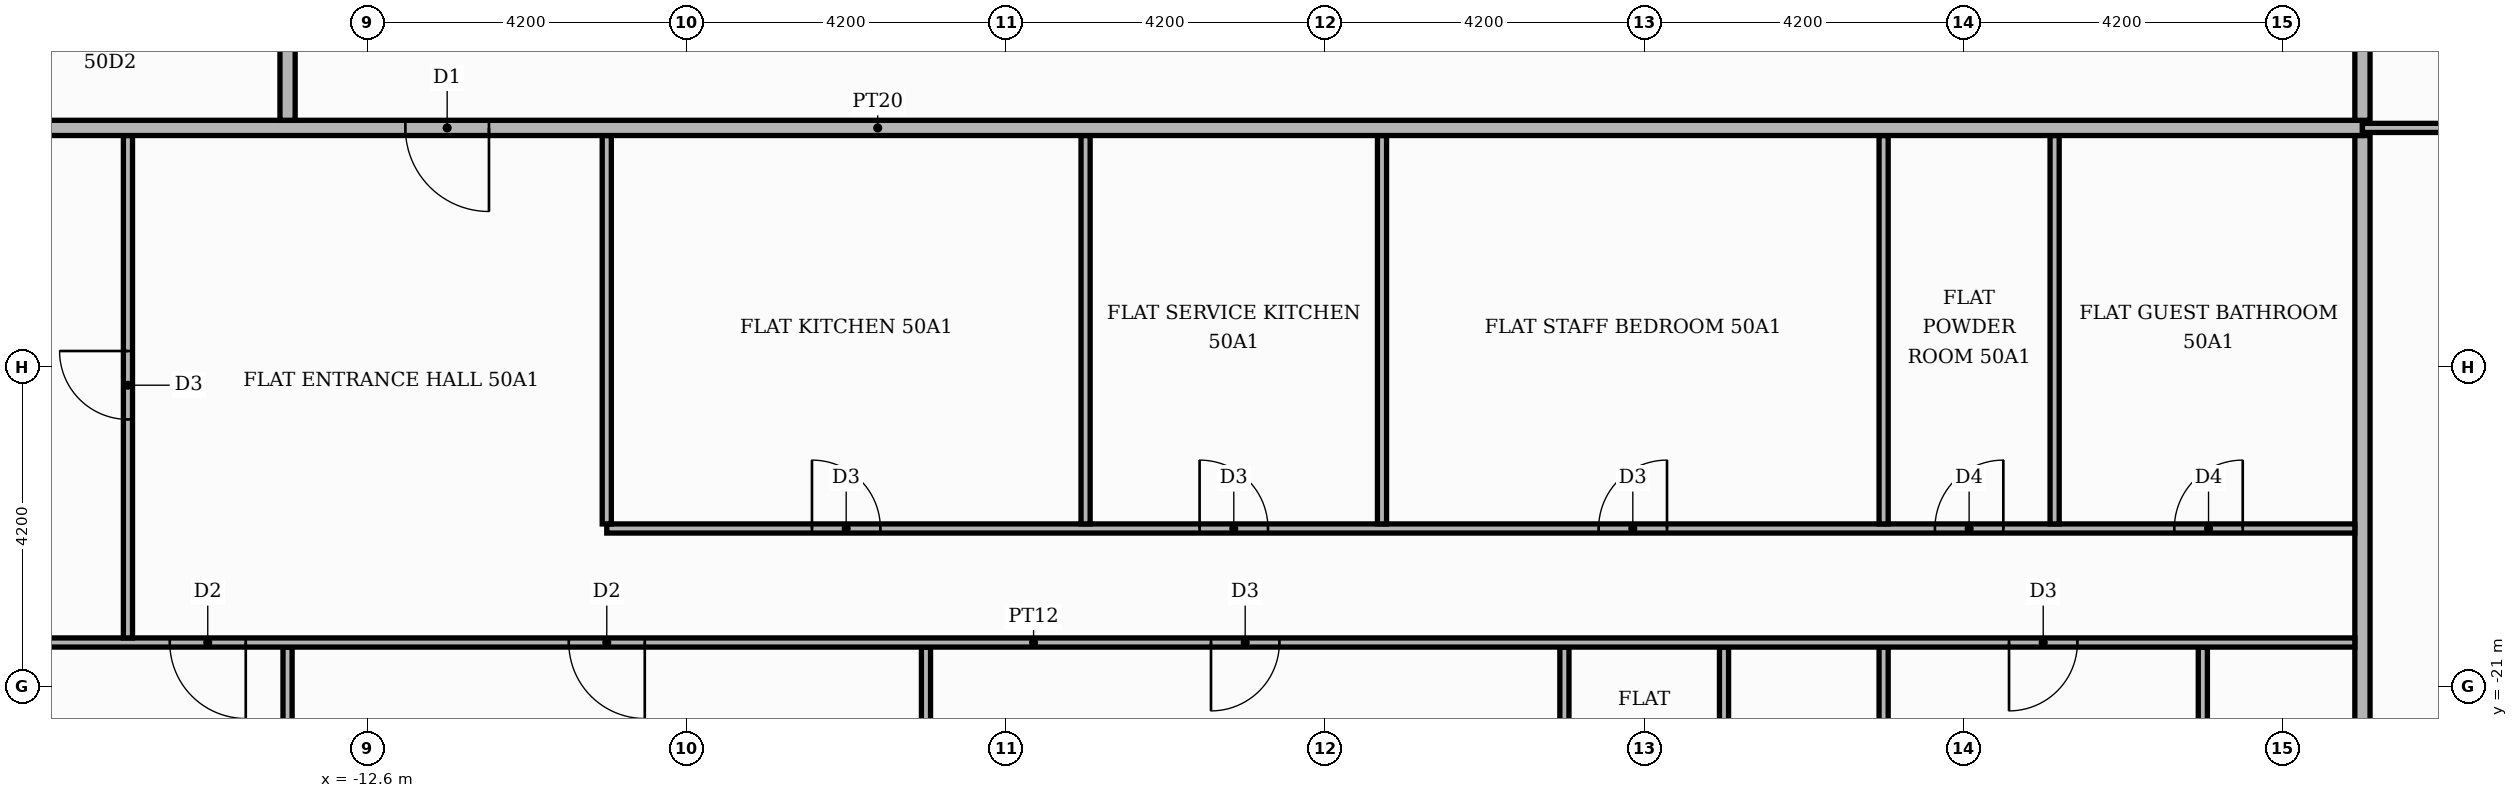
"""IFC4 building model, lengths in metres.
Left out: names, types, materials, properties, quantities, classifications, styles, units other than length and angle.
Written with IfcOpenShell. Run it as: python <this file> out.ifc"""

import sys

from ifc_helpers import new_model, si_unit, direction, frame, frame_2d, origin, place, context, subcontext, project, spatial, rectangle, extrude, element, fill, save


model = new_model("IFC4")
c1 = context("Model", 3, precision=1e-05, world=origin(), true_north=direction((0.0, 1.0)))
c2 = subcontext(c1, "Body", "Model", "MODEL_VIEW")
j1 = project(units=[si_unit("LENGTHUNIT", "METRE"), si_unit("PLANEANGLEUNIT", "RADIAN")], contexts=[c1])
p1 = place(None, origin())
s1 = spatial("IfcSite", under=j1, at=p1, CompositionType="ELEMENT")
p2 = place(p1, origin())
s2 = spatial("IfcBuilding", under=s1, at=p2, CompositionType="ELEMENT")
p3 = place(p2, frame((0.0, 0.0, 211.8)))
s3 = spatial("IfcBuildingStorey", under=s2, at=p3, CompositionType="ELEMENT", Elevation=211.8)
for number, where, z_axis, x_axis in (
    (1, (-13.65, -25.42, 0.0), (0.0, 0.0, 1.0), (0.0, 1.0, 0.0)),
    (2, (-5.25, -25.42, 0.0), (0.0, 0.0, 1.0), (0.0, 1.0, 0.0)),
):
    element("IfcWall", number, at=place(p3, frame(where, z_axis=z_axis, x_axis=x_axis)), inside=s3, PredefinedType="PARTITIONING", context=c2, shape_type="SweptSolid", body=[
        extrude(rectangle(XDim=4.94, YDim=0.12, at=frame_2d((2.47, 0.0))), origin(), (0.0, 0.0, 1.0), 3.48),
    ])
p4 = place(p3, frame((3.15, -25.42, 0.0), z_axis=(0.0, 0.0, 1.0), x_axis=(0.0, 1.0, 0.0)))
e3 = element("IfcWall", 3, at=p4, inside=s3, PredefinedType="PARTITIONING", context=c2, shape_type="SweptSolid", body=[
    extrude(rectangle(XDim=4.94, YDim=0.12, at=frame_2d((2.47, 0.0))), origin(), (0.0, 0.0, 1.0), 3.48),
])
p5 = place(p4, frame((1.9, 0.0, 0.0)))
e4 = element("IfcOpeningElement", 4, at=p5, cuts=e3, PredefinedType="OPENING", context=c2, shape_type="SweptSolid", body=[
    extrude(rectangle(XDim=0.9, YDim=2.1, at=frame_2d((0.45, 1.05))), frame((0.0, 0.07, 0.0), z_axis=(0.0, -1.0, 0.0), x_axis=(1.0, 0.0, 0.0)), (0.0, 0.0, 1.0), 0.14),
])
p6 = place(p3, frame((5.25, -25.42, 0.0), z_axis=(0.0, 0.0, 1.0), x_axis=(0.0, 1.0, 0.0)))
e5 = element("IfcWall", 5, at=p6, inside=s3, PredefinedType="PARTITIONING", context=c2, shape_type="SweptSolid", body=[
    extrude(rectangle(XDim=4.94, YDim=0.12, at=frame_2d((2.47, 0.0))), origin(), (0.0, 0.0, 1.0), 3.48),
])
p7 = place(p6, frame((1.9, 0.0, 0.0)))
e6 = element("IfcOpeningElement", 6, at=p7, cuts=e5, PredefinedType="OPENING", context=c2, shape_type="SweptSolid", body=[
    extrude(rectangle(XDim=0.9, YDim=2.1, at=frame_2d((0.45, 1.05))), frame((0.0, 0.07, 0.0), z_axis=(0.0, -1.0, 0.0), x_axis=(1.0, 0.0, 0.0)), (0.0, 0.0, 1.0), 0.14),
])
p8 = place(p3, frame((7.35, -25.42, 0.0), z_axis=(0.0, 0.0, 1.0), x_axis=(0.0, 1.0, 0.0)))
e7 = element("IfcWall", 7, at=p8, inside=s3, PredefinedType="PARTITIONING", context=c2, shape_type="SweptSolid", body=[
    extrude(rectangle(XDim=4.94, YDim=0.12, at=frame_2d((2.47, 0.0))), origin(), (0.0, 0.0, 1.0), 3.48),
])
p9 = place(p3, frame((11.55, -25.42, 0.0), z_axis=(0.0, 0.0, 1.0), x_axis=(0.0, 1.0, 0.0)))
e8 = element("IfcWall", 8, at=p9, inside=s3, PredefinedType="PARTITIONING", context=c2, shape_type="SweptSolid", body=[
    extrude(rectangle(XDim=4.94, YDim=0.12, at=frame_2d((2.47, 0.0))), origin(), (0.0, 0.0, 1.0), 3.48),
])
p10 = place(p9, frame((1.9, 0.0, 0.0)))
e9 = element("IfcOpeningElement", 9, at=p10, cuts=e8, PredefinedType="OPENING", context=c2, shape_type="SweptSolid", body=[
    extrude(rectangle(XDim=0.9, YDim=2.1, at=frame_2d((0.45, 1.05))), frame((0.0, 0.07, 0.0), z_axis=(0.0, -1.0, 0.0), x_axis=(1.0, 0.0, 0.0)), (0.0, 0.0, 1.0), 0.14),
])
p11 = place(p3, frame((13.65, -25.42, 0.0), z_axis=(0.0, 0.0, 1.0), x_axis=(0.0, 1.0, 0.0)))
e10 = element("IfcWall", 10, at=p11, inside=s3, PredefinedType="PARTITIONING", context=c2, shape_type="SweptSolid", body=[
    extrude(rectangle(XDim=11.67, YDim=0.2, at=frame_2d((5.835, 0.0))), origin(), (0.0, 0.0, 1.0), 3.48),
])
p12 = place(p3, frame((-21.219, -20.42, 0.0), z_axis=(0.0, 0.0, 1.0), x_axis=(1.0, 0.0, 0.0)))
e11 = element("IfcWall", 11, at=p12, inside=s3, PredefinedType="PARTITIONING", context=c2, shape_type="SweptSolid", body=[
    extrude(rectangle(XDim=34.769, YDim=0.12, at=frame_2d((17.385, 0.0))), origin(), (0.0, 0.0, 1.0), 3.48),
])
p13 = place(p12, frame((6.019, 0.0, 0.0)))
e12 = element("IfcOpeningElement", 12, at=p13, cuts=e11, PredefinedType="OPENING", context=c2, shape_type="SweptSolid", body=[
    extrude(rectangle(XDim=1.0, YDim=2.1, at=frame_2d((0.5, 1.05))), frame((0.0, 0.07, 0.0), z_axis=(0.0, -1.0, 0.0), x_axis=(1.0, 0.0, 0.0)), (0.0, 0.0, 1.0), 0.14),
])
p14 = place(p12, frame((11.269, 0.0, 0.0)))
e13 = element("IfcOpeningElement", 13, at=p14, cuts=e11, PredefinedType="OPENING", context=c2, shape_type="SweptSolid", body=[
    extrude(rectangle(XDim=1.0, YDim=2.1, at=frame_2d((0.5, 1.05))), frame((0.0, 0.07, 0.0), z_axis=(0.0, -1.0, 0.0), x_axis=(1.0, 0.0, 0.0)), (0.0, 0.0, 1.0), 0.14),
])
p15 = place(p12, frame((19.719, 0.0, 0.0)))
e14 = element("IfcOpeningElement", 14, at=p15, cuts=e11, PredefinedType="OPENING", context=c2, shape_type="SweptSolid", body=[
    extrude(rectangle(XDim=0.9, YDim=2.1, at=frame_2d((0.45, 1.05))), frame((0.0, 0.07, 0.0), z_axis=(0.0, -1.0, 0.0), x_axis=(1.0, 0.0, 0.0)), (0.0, 0.0, 1.0), 0.14),
])
p16 = place(p12, frame((30.219, 0.0, 0.0)))
e15 = element("IfcOpeningElement", 15, at=p16, cuts=e11, PredefinedType="OPENING", context=c2, shape_type="SweptSolid", body=[
    extrude(rectangle(XDim=0.9, YDim=2.1, at=frame_2d((0.45, 1.05))), frame((0.0, 0.07, 0.0), z_axis=(0.0, -1.0, 0.0), x_axis=(1.0, 0.0, 0.0)), (0.0, 0.0, 1.0), 0.14),
])
p17 = place(p3, frame((-15.75, -20.36, 0.0), z_axis=(0.0, 0.0, 1.0), x_axis=(0.0, 1.0, 0.0)))
e16 = element("IfcWall", 16, at=p17, inside=s3, PredefinedType="PARTITIONING", context=c2, shape_type="SweptSolid", body=[
    extrude(rectangle(XDim=6.61, YDim=0.12, at=frame_2d((3.305, 0.0))), origin(), (0.0, 0.0, 1.0), 3.48),
])
p18 = place(p17, frame((2.875, 0.0, 0.0)))
e17 = element("IfcOpeningElement", 17, at=p18, cuts=e16, PredefinedType="OPENING", context=c2, shape_type="SweptSolid", body=[
    extrude(rectangle(XDim=0.9, YDim=2.1, at=frame_2d((0.45, 1.05))), frame((0.0, 0.07, 0.0), z_axis=(0.0, -1.0, 0.0), x_axis=(1.0, 0.0, 0.0)), (0.0, 0.0, 1.0), 0.14),
])
p19 = place(p3, frame((-9.45, -18.92, 0.0), z_axis=(0.0, 0.0, 1.0), x_axis=(1.0, 0.0, 0.0)))
e18 = element("IfcWall", 18, at=p19, inside=s3, PredefinedType="PARTITIONING", context=c2, shape_type="SweptSolid", body=[
    extrude(rectangle(XDim=23.0, YDim=0.12, at=frame_2d((11.5, 0.0))), origin(), (0.0, 0.0, 1.0), 3.48),
])
p20 = place(p19, frame((2.7, 0.0, 0.0)))
e19 = element("IfcOpeningElement", 19, at=p20, cuts=e18, PredefinedType="OPENING", context=c2, shape_type="SweptSolid", body=[
    extrude(rectangle(XDim=0.9, YDim=2.1, at=frame_2d((0.45, 1.05))), frame((0.0, 0.07, 0.0), z_axis=(0.0, -1.0, 0.0), x_axis=(1.0, 0.0, 0.0)), (0.0, 0.0, 1.0), 0.14),
])
p21 = place(p19, frame((7.8, 0.0, 0.0)))
e20 = element("IfcOpeningElement", 20, at=p21, cuts=e18, PredefinedType="OPENING", context=c2, shape_type="SweptSolid", body=[
    extrude(rectangle(XDim=0.9, YDim=2.1, at=frame_2d((0.45, 1.05))), frame((0.0, 0.07, 0.0), z_axis=(0.0, -1.0, 0.0), x_axis=(1.0, 0.0, 0.0)), (0.0, 0.0, 1.0), 0.14),
])
p22 = place(p19, frame((13.05, 0.0, 0.0)))
e21 = element("IfcOpeningElement", 21, at=p22, cuts=e18, PredefinedType="OPENING", context=c2, shape_type="SweptSolid", body=[
    extrude(rectangle(XDim=0.9, YDim=2.1, at=frame_2d((0.45, 1.05))), frame((0.0, 0.07, 0.0), z_axis=(0.0, -1.0, 0.0), x_axis=(1.0, 0.0, 0.0)), (0.0, 0.0, 1.0), 0.14),
])
p23 = place(p19, frame((17.475, 0.0, 0.0)))
e22 = element("IfcOpeningElement", 22, at=p23, cuts=e18, PredefinedType="OPENING", context=c2, shape_type="SweptSolid", body=[
    extrude(rectangle(XDim=0.9, YDim=2.1, at=frame_2d((0.45, 1.05))), frame((0.0, 0.07, 0.0), z_axis=(0.0, -1.0, 0.0), x_axis=(1.0, 0.0, 0.0)), (0.0, 0.0, 1.0), 0.14),
])
p24 = place(p19, frame((20.625, 0.0, 0.0)))
e23 = element("IfcOpeningElement", 23, at=p24, cuts=e18, PredefinedType="OPENING", context=c2, shape_type="SweptSolid", body=[
    extrude(rectangle(XDim=0.9, YDim=2.1, at=frame_2d((0.45, 1.05))), frame((0.0, 0.07, 0.0), z_axis=(0.0, -1.0, 0.0), x_axis=(1.0, 0.0, 0.0)), (0.0, 0.0, 1.0), 0.14),
])
for number, where, z_axis, x_axis in (
    (24, (-9.45, -18.86, 0.0), (0.0, 0.0, 1.0), (0.0, 1.0, 0.0)),
    (25, (-3.15, -18.86, 0.0), (0.0, 0.0, 1.0), (0.0, 1.0, 0.0)),
    (26, (0.75, -18.86, 0.0), (0.0, 0.0, 1.0), (0.0, 1.0, 0.0)),
    (27, (7.35, -18.86, 0.0), (0.0, 0.0, 1.0), (0.0, 1.0, 0.0)),
    (28, (9.6, -18.86, 0.0), (0.0, 0.0, 1.0), (0.0, 1.0, 0.0)),
):
    element("IfcWall", number, at=place(p3, frame(where, z_axis=z_axis, x_axis=x_axis)), inside=s3, PredefinedType="PARTITIONING", context=c2, shape_type="SweptSolid", body=[
        extrude(rectangle(XDim=5.11, YDim=0.12, at=frame_2d((2.555, 0.0))), origin(), (0.0, 0.0, 1.0), 3.48),
    ])
p25 = place(p3, frame((-25.42, -13.65, 0.0), z_axis=(0.0, 0.0, 1.0), x_axis=(1.0, 0.0, 0.0)))
e29 = element("IfcWall", 29, at=p25, inside=s3, PredefinedType="PARTITIONING", context=c2, shape_type="SweptSolid", body=[
    extrude(rectangle(XDim=39.07, YDim=0.2, at=frame_2d((19.535, 0.0))), origin(), (0.0, 0.0, 1.0), 3.48),
])
p26 = place(p25, frame((13.32, 0.0, 0.0)))
e30 = element("IfcOpeningElement", 30, at=p26, cuts=e29, PredefinedType="OPENING", context=c2, shape_type="SweptSolid", body=[
    extrude(rectangle(XDim=1.1, YDim=2.4, at=frame_2d((0.55, 1.2))), frame((0.0, 0.11, 0.0), z_axis=(0.0, -1.0, 0.0), x_axis=(1.0, 0.0, 0.0)), (0.0, 0.0, 1.0), 0.22),
])
p27 = place(p3, frame((13.65, -13.65, 0.0), z_axis=(0.0, 0.0, 1.0), x_axis=(1.0, 0.0, 0.0)))
e31 = element("IfcWall", 31, at=p27, inside=s3, PredefinedType="PARTITIONING", context=c2, shape_type="SweptSolid", body=[
    extrude(rectangle(XDim=6.47, YDim=0.12, at=frame_2d((3.235, 0.0))), origin(), (0.0, 0.0, 1.0), 3.48),
])
p28 = place(p27, frame((2.785, 0.0, 0.0)))
e32 = element("IfcOpeningElement", 32, at=p28, cuts=e31, PredefinedType="OPENING", context=c2, shape_type="SweptSolid", body=[
    extrude(rectangle(XDim=0.9, YDim=2.1, at=frame_2d((0.45, 1.05))), frame((0.0, 0.07, 0.0), z_axis=(0.0, -1.0, 0.0), x_axis=(1.0, 0.0, 0.0)), (0.0, 0.0, 1.0), 0.14),
])
p29 = place(p3, frame((-13.65, -13.55, 0.0), z_axis=(0.0, 0.0, 1.0), x_axis=(0.0, 1.0, 0.0)))
e33 = element("IfcWall", 33, at=p29, inside=s3, PredefinedType="PARTITIONING", context=c2, shape_type="SweptSolid", body=[
    extrude(rectangle(XDim=18.7, YDim=0.2, at=frame_2d((9.35, 0.0))), origin(), (0.0, 0.0, 1.0), 3.48),
])
p30 = place(p29, frame((16.15, 0.0, 0.0)))
e34 = element("IfcOpeningElement", 34, at=p30, cuts=e33, PredefinedType="OPENING", context=c2, shape_type="SweptSolid", body=[
    extrude(rectangle(XDim=1.1, YDim=2.4, at=frame_2d((0.55, 1.2))), frame((0.0, 0.11, 0.0), z_axis=(0.0, -1.0, 0.0), x_axis=(1.0, 0.0, 0.0)), (0.0, 0.0, 1.0), 0.22),
])
p31 = place(p3, frame((13.65, -13.55, 0.0), z_axis=(0.0, 0.0, 1.0), x_axis=(0.0, 1.0, 0.0)))
e35 = element("IfcWall", 35, at=p31, inside=s3, PredefinedType="PARTITIONING", context=c2, shape_type="SweptSolid", body=[
    extrude(rectangle(XDim=2.45, YDim=0.2, at=frame_2d((1.225, 0.0))), origin(), (0.0, 0.0, 1.0), 3.48),
])
p32 = place(p26, frame((1.1, 0.0, 0.0), z_axis=(0.0, 0.0, 1.0), x_axis=(-1.0, 0.0, 0.0)))
e36 = element("IfcDoor", 36, at=p32, inside=s3, OperationType="SINGLE_SWING_RIGHT", PredefinedType="DOOR", context=c2, shape_type="SweptSolid", body=[
    extrude(rectangle(XDim=1.1, YDim=2.4, at=frame_2d((0.55, 1.2))), frame((0.0, 0.025, 0.0), z_axis=(0.0, -1.0, 0.0), x_axis=(1.0, 0.0, 0.0)), (0.0, 0.0, 1.0), 0.05),
])
fill(e30, e36)
p33 = place(p18, origin())
e37 = element("IfcDoor", 37, at=p33, inside=s3, OperationType="SINGLE_SWING_RIGHT", PredefinedType="DOOR", context=c2, shape_type="SweptSolid", body=[
    extrude(rectangle(XDim=0.9, YDim=2.1, at=frame_2d((0.45, 1.05))), frame((0.0, 0.025, 0.0), z_axis=(0.0, -1.0, 0.0), x_axis=(1.0, 0.0, 0.0)), (0.0, 0.0, 1.0), 0.05),
])
fill(e17, e37)
p34 = place(p20, origin())
e38 = element("IfcDoor", 38, at=p34, inside=s3, OperationType="SINGLE_SWING_LEFT", PredefinedType="DOOR", context=c2, shape_type="SweptSolid", body=[
    extrude(rectangle(XDim=0.9, YDim=2.1, at=frame_2d((0.45, 1.05))), frame((0.0, 0.025, 0.0), z_axis=(0.0, -1.0, 0.0), x_axis=(1.0, 0.0, 0.0)), (0.0, 0.0, 1.0), 0.05),
])
fill(e19, e38)
p35 = place(p21, origin())
e39 = element("IfcDoor", 39, at=p35, inside=s3, OperationType="SINGLE_SWING_LEFT", PredefinedType="DOOR", context=c2, shape_type="SweptSolid", body=[
    extrude(rectangle(XDim=0.9, YDim=2.1, at=frame_2d((0.45, 1.05))), frame((0.0, 0.025, 0.0), z_axis=(0.0, -1.0, 0.0), x_axis=(1.0, 0.0, 0.0)), (0.0, 0.0, 1.0), 0.05),
])
fill(e20, e39)
p36 = place(p22, origin())
e40 = element("IfcDoor", 40, at=p36, inside=s3, OperationType="SINGLE_SWING_RIGHT", PredefinedType="DOOR", context=c2, shape_type="SweptSolid", body=[
    extrude(rectangle(XDim=0.9, YDim=2.1, at=frame_2d((0.45, 1.05))), frame((0.0, 0.025, 0.0), z_axis=(0.0, -1.0, 0.0), x_axis=(1.0, 0.0, 0.0)), (0.0, 0.0, 1.0), 0.05),
])
fill(e21, e40)
p37 = place(p23, origin())
e41 = element("IfcDoor", 41, at=p37, inside=s3, OperationType="SINGLE_SWING_RIGHT", PredefinedType="DOOR", context=c2, shape_type="SweptSolid", body=[
    extrude(rectangle(XDim=0.9, YDim=2.1, at=frame_2d((0.45, 1.05))), frame((0.0, 0.025, 0.0), z_axis=(0.0, -1.0, 0.0), x_axis=(1.0, 0.0, 0.0)), (0.0, 0.0, 1.0), 0.05),
])
fill(e22, e41)
p38 = place(p24, origin())
e42 = element("IfcDoor", 42, at=p38, inside=s3, OperationType="SINGLE_SWING_RIGHT", PredefinedType="DOOR", context=c2, shape_type="SweptSolid", body=[
    extrude(rectangle(XDim=0.9, YDim=2.1, at=frame_2d((0.45, 1.05))), frame((0.0, 0.025, 0.0), z_axis=(0.0, -1.0, 0.0), x_axis=(1.0, 0.0, 0.0)), (0.0, 0.0, 1.0), 0.05),
])
fill(e23, e42)
p39 = place(p13, frame((1.0, 0.0, 0.0), z_axis=(0.0, 0.0, 1.0), x_axis=(-1.0, 0.0, 0.0)))
e43 = element("IfcDoor", 43, at=p39, inside=s3, OperationType="SINGLE_SWING_RIGHT", PredefinedType="DOOR", context=c2, shape_type="SweptSolid", body=[
    extrude(rectangle(XDim=1.0, YDim=2.1, at=frame_2d((0.5, 1.05))), frame((0.0, 0.025, 0.0), z_axis=(0.0, -1.0, 0.0), x_axis=(1.0, 0.0, 0.0)), (0.0, 0.0, 1.0), 0.05),
])
fill(e12, e43)
p40 = place(p14, frame((1.0, 0.0, 0.0), z_axis=(0.0, 0.0, 1.0), x_axis=(-1.0, 0.0, 0.0)))
e44 = element("IfcDoor", 44, at=p40, inside=s3, OperationType="SINGLE_SWING_RIGHT", PredefinedType="DOOR", context=c2, shape_type="SweptSolid", body=[
    extrude(rectangle(XDim=1.0, YDim=2.1, at=frame_2d((0.5, 1.05))), frame((0.0, 0.025, 0.0), z_axis=(0.0, -1.0, 0.0), x_axis=(1.0, 0.0, 0.0)), (0.0, 0.0, 1.0), 0.05),
])
fill(e13, e44)
p41 = place(p15, frame((0.9, 0.0, 0.0), z_axis=(0.0, 0.0, 1.0), x_axis=(-1.0, 0.0, 0.0)))
e45 = element("IfcDoor", 45, at=p41, inside=s3, OperationType="SINGLE_SWING_LEFT", PredefinedType="DOOR", context=c2, shape_type="SweptSolid", body=[
    extrude(rectangle(XDim=0.9, YDim=2.1, at=frame_2d((0.45, 1.05))), frame((0.0, 0.025, 0.0), z_axis=(0.0, -1.0, 0.0), x_axis=(1.0, 0.0, 0.0)), (0.0, 0.0, 1.0), 0.05),
])
fill(e14, e45)
p42 = place(p16, frame((0.9, 0.0, 0.0), z_axis=(0.0, 0.0, 1.0), x_axis=(-1.0, 0.0, 0.0)))
e46 = element("IfcDoor", 46, at=p42, inside=s3, OperationType="SINGLE_SWING_LEFT", PredefinedType="DOOR", context=c2, shape_type="SweptSolid", body=[
    extrude(rectangle(XDim=0.9, YDim=2.1, at=frame_2d((0.45, 1.05))), frame((0.0, 0.025, 0.0), z_axis=(0.0, -1.0, 0.0), x_axis=(1.0, 0.0, 0.0)), (0.0, 0.0, 1.0), 0.05),
])
fill(e15, e46)
save(model, sys.argv[1])
